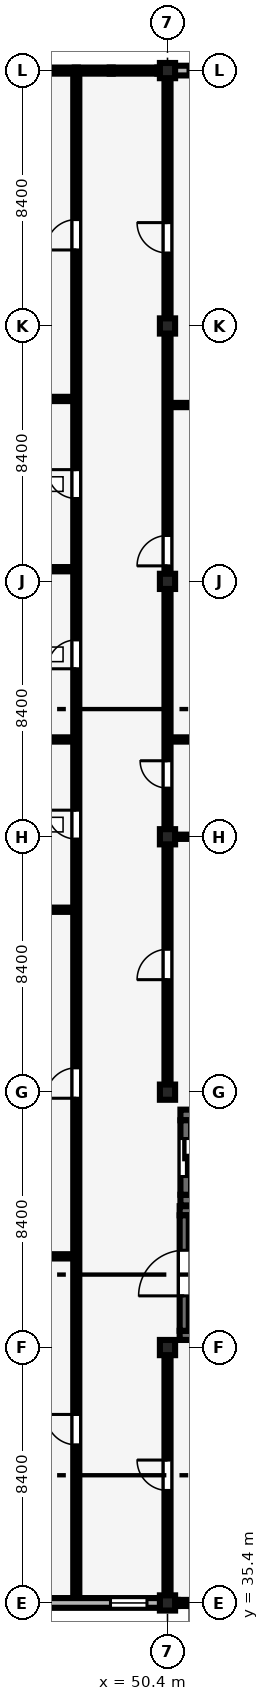
"""IFC4 building model, lengths in metres.
Left out: names, types, materials, properties, quantities, classifications, styles, units other than length and angle.
Written with IfcOpenShell. Run it as: python <this file> out.ifc"""

import sys

from ifc_helpers import new_model, si_unit, direction, frame, frame_2d, origin, origin_2d, place, context, subcontext, project, spatial, rectangle, extrude, element, fill, save


model = new_model("IFC4")
c1 = context("Model", 3, precision=1e-05, world=origin(), true_north=direction((0.0, 1.0)))
c2 = subcontext(c1, "Body", "Model", "MODEL_VIEW")
j1 = project(units=[si_unit("LENGTHUNIT", "METRE"), si_unit("PLANEANGLEUNIT", "RADIAN")], contexts=[c1])
p1 = place(None, origin())
s1 = spatial("IfcSite", under=j1, at=p1, CompositionType="ELEMENT")
p2 = place(p1, origin())
s2 = spatial("IfcBuilding", under=s1, at=p2, CompositionType="ELEMENT")
p3 = place(p2, frame((0.0, 0.0, 13.2)))
s3 = spatial("IfcBuildingStorey", under=s2, at=p3, CompositionType="ELEMENT", Elevation=13.2)
for number, where, z_axis, x_axis in (
    (1, (50.4, 35.4, 0.0), (0.0, 0.0, 1.0), (1.0, 0.0, 0.0)),
    (2, (50.4, 43.8, 0.0), (0.0, 0.0, 1.0), (1.0, 0.0, 0.0)),
    (3, (50.4, 52.2, 0.0), (0.0, 0.0, 1.0), (1.0, 0.0, 0.0)),
    (4, (50.4, 60.6, 0.0), (0.0, 0.0, 1.0), (1.0, 0.0, 0.0)),
    (5, (50.4, 69.0, 0.0), (0.0, 0.0, 1.0), (1.0, 0.0, 0.0)),
    (6, (50.4, 77.4, 0.0), (0.0, 0.0, 1.0), (1.0, 0.0, 0.0)),
    (7, (50.4, 85.8, 0.0), (0.0, 0.0, 1.0), (1.0, 0.0, 0.0)),
):
    element("IfcColumn", number, at=place(p3, frame(where, z_axis=z_axis, x_axis=x_axis)), inside=s3, PredefinedType="COLUMN", context=c2, shape_type="SweptSolid", body=[
        extrude(rectangle(XDim=0.5, YDim=0.5, at=origin_2d()), origin(), (0.0, 0.0, 1.0), 4.2),
    ])
p4 = place(p3, frame((42.225, 35.4, 0.0), z_axis=(0.0, 0.0, 1.0), x_axis=(1.0, 0.0, 0.0)))
e8 = element("IfcWall", 8, at=p4, inside=s3, PredefinedType="SOLIDWALL", context=c2, shape_type="SweptSolid", body=[
    extrude(rectangle(XDim=7.95, YDim=0.32, at=frame_2d((3.975, 0.0))), origin(), (0.0, 0.0, 1.0), 2.98),
])
p5 = place(p4, frame((0.45, 0.0, 0.9)))
e9 = element("IfcOpeningElement", 9, at=p5, cuts=e8, PredefinedType="OPENING", context=c2, shape_type="SweptSolid", body=[
    extrude(rectangle(XDim=1.2, YDim=1.5, at=frame_2d((0.6, 0.75))), frame((0.0, 0.17, 0.0), z_axis=(0.0, -1.0, 0.0), x_axis=(1.0, 0.0, 0.0)), (0.0, 0.0, 1.0), 0.34),
])
p6 = place(p4, frame((6.3, 0.0, 0.9)))
e10 = element("IfcOpeningElement", 10, at=p6, cuts=e8, PredefinedType="OPENING", context=c2, shape_type="SweptSolid", body=[
    extrude(rectangle(XDim=1.2, YDim=1.8, at=frame_2d((0.6, 0.9))), frame((0.0, 0.17, 0.0), z_axis=(0.0, -1.0, 0.0), x_axis=(1.0, 0.0, 0.0)), (0.0, 0.0, 1.0), 0.34),
])
p7 = place(p3, frame((50.625, 85.8, 0.0), z_axis=(0.0, 0.0, 1.0), x_axis=(1.0, 0.0, 0.0)))
e11 = element("IfcWall", 11, at=p7, inside=s3, PredefinedType="SOLIDWALL", context=c2, shape_type="SweptSolid", body=[
    extrude(rectangle(XDim=7.95, YDim=0.32, at=frame_2d((3.975, 0.0))), origin(), (0.0, 0.0, 1.0), 3.16),
])
p8 = place(p7, frame((0.45, 0.0, 0.9)))
e12 = element("IfcOpeningElement", 12, at=p8, cuts=e11, PredefinedType="OPENING", context=c2, shape_type="SweptSolid", body=[
    extrude(rectangle(XDim=1.2, YDim=1.8, at=frame_2d((0.6, 0.9))), frame((0.0, 0.17, 0.0), z_axis=(0.0, -1.0, 0.0), x_axis=(1.0, 0.0, 0.0)), (0.0, 0.0, 1.0), 0.34),
])
p9 = place(p7, frame((6.02, 0.0, 0.9)))
e13 = element("IfcOpeningElement", 13, at=p9, cuts=e11, PredefinedType="OPENING", context=c2, shape_type="SweptSolid", body=[
    extrude(rectangle(XDim=1.68, YDim=2.11, at=frame_2d((0.84, 1.055))), frame((0.0, 0.17, 0.0), z_axis=(0.0, -1.0, 0.0), x_axis=(1.0, 0.0, 0.0)), (0.0, 0.0, 1.0), 0.34),
])
for number, where, z_axis, x_axis in (
    (14, (50.8, 44.2, 0.0), (0.0, 0.0, 1.0), (1.0, 0.0, 0.0)),
    (15, (50.8, 48.3, 0.0), (0.0, 0.0, 1.0), (1.0, 0.0, 0.0)),
):
    element("IfcWall", number, at=place(p3, frame(where, z_axis=z_axis, x_axis=x_axis)), inside=s3, PredefinedType="SHEAR", context=c2, shape_type="SweptSolid", body=[
        extrude(rectangle(XDim=7.6, YDim=0.3, at=frame_2d((3.8, 0.0))), origin(), (0.0, 0.0, 1.0), 4.025),
    ])
p10 = place(p3, frame((50.95, 44.35, 0.0), z_axis=(0.0, 0.0, 1.0), x_axis=(0.0, 1.0, 0.0)))
e16 = element("IfcWall", 16, at=p10, inside=s3, PredefinedType="SHEAR", context=c2, shape_type="SweptSolid", body=[
    extrude(rectangle(XDim=3.8, YDim=0.3, at=frame_2d((1.9, 0.0))), origin(), (0.0, 0.0, 1.0), 4.025),
])
p11 = place(p10, frame((1.15, 0.0, 0.0)))
e17 = element("IfcOpeningElement", 17, at=p11, cuts=e16, PredefinedType="OPENING", context=c2, shape_type="SweptSolid", body=[
    extrude(rectangle(XDim=1.5, YDim=2.2, at=frame_2d((0.75, 1.1))), frame((0.0, 0.16, 0.0), z_axis=(0.0, -1.0, 0.0), x_axis=(1.0, 0.0, 0.0)), (0.0, 0.0, 1.0), 0.32),
])
for number, where, z_axis, x_axis in (
    (18, (50.825, 48.65, 0.0), (0.0, 0.0, 1.0), (1.0, 0.0, 0.0)),
    (19, (50.825, 51.45, 0.0), (0.0, 0.0, 1.0), (1.0, 0.0, 0.0)),
):
    element("IfcWall", number, at=place(p3, frame(where, z_axis=z_axis, x_axis=x_axis)), inside=s3, PredefinedType="SHEAR", context=c2, shape_type="SweptSolid", body=[
        extrude(rectangle(XDim=3.55, YDim=0.35, at=frame_2d((1.775, 0.0))), origin(), (0.0, 0.0, 1.0), 3.92),
    ])
p12 = place(p3, frame((51.0, 48.825, 0.0), z_axis=(0.0, 0.0, 1.0), x_axis=(0.0, 1.0, 0.0)))
e20 = element("IfcWall", 20, at=p12, inside=s3, PredefinedType="SHEAR", context=c2, shape_type="SweptSolid", body=[
    extrude(rectangle(XDim=2.45, YDim=0.35, at=frame_2d((1.225, 0.0))), origin(), (0.0, 0.0, 1.0), 3.92),
])
p13 = place(p12, frame((0.6, 0.0, 0.0)))
e21 = element("IfcOpeningElement", 21, at=p13, cuts=e20, PredefinedType="OPENING", context=c2, shape_type="SweptSolid", body=[
    extrude(rectangle(XDim=1.25, YDim=2.25, at=frame_2d((0.625, 1.125))), frame((0.0, 0.185, 0.0), z_axis=(0.0, -1.0, 0.0), x_axis=(1.0, 0.0, 0.0)), (0.0, 0.0, 1.0), 0.37),
])
p14 = place(p3, frame((42.105, 46.8, 0.0), z_axis=(0.0, 0.0, 1.0), x_axis=(1.0, 0.0, 0.0)))
e22 = element("IfcWall", 22, at=p14, inside=s3, PredefinedType="PARTITIONING", context=c2, shape_type="SweptSolid", body=[
    extrude(rectangle(XDim=5.19, YDim=0.14, at=frame_2d((2.595, 0.0))), origin(), (0.0, 0.0, 1.0), 3.51),
])
p15 = place(p3, frame((42.165, 58.2, 0.0), z_axis=(0.0, 0.0, 1.0), x_axis=(1.0, 0.0, 0.0)))
e23 = element("IfcWall", 23, at=p15, inside=s3, PredefinedType="PARTITIONING", context=c2, shape_type="SweptSolid", body=[
    extrude(rectangle(XDim=5.13, YDim=0.14, at=frame_2d((2.565, 0.0))), origin(), (0.0, 0.0, 1.0), 3.9),
])
p16 = place(p3, frame((42.195, 63.8, 0.0), z_axis=(0.0, 0.0, 1.0), x_axis=(1.0, 0.0, 0.0)))
e24 = element("IfcWall", 24, at=p16, inside=s3, PredefinedType="PARTITIONING", context=c2, shape_type="SweptSolid", body=[
    extrude(rectangle(XDim=5.1, YDim=0.14, at=frame_2d((2.55, 0.0))), origin(), (0.0, 0.0, 1.0), 3.51),
])
for number, where, z_axis, x_axis in (
    (25, (42.195, 69.4, 0.0), (0.0, 0.0, 1.0), (1.0, 0.0, 0.0)),
    (26, (42.195, 75.0, 0.0), (0.0, 0.0, 1.0), (1.0, 0.0, 0.0)),
):
    element("IfcWall", number, at=place(p3, frame(where, z_axis=z_axis, x_axis=x_axis)), inside=s3, PredefinedType="PARTITIONING", context=c2, shape_type="SweptSolid", body=[
        extrude(rectangle(XDim=5.1, YDim=0.14, at=frame_2d((2.55, 0.0))), origin(), (0.0, 0.0, 1.0), 3.9),
    ])
p17 = place(p3, frame((47.4, 35.565, 0.0), z_axis=(0.0, 0.0, 1.0), x_axis=(0.0, 1.0, 0.0)))
e27 = element("IfcWall", 27, at=p17, inside=s3, PredefinedType="PARTITIONING", context=c2, shape_type="SweptSolid", body=[
    extrude(rectangle(XDim=50.13, YDim=0.2, at=frame_2d((25.065, 0.0))), origin(), (0.0, 0.0, 1.0), 3.9),
])
p18 = place(p17, frame((5.035, 0.0, 0.0)))
e28 = element("IfcOpeningElement", 28, at=p18, cuts=e27, PredefinedType="OPENING", context=c2, shape_type="SweptSolid", body=[
    extrude(rectangle(XDim=1.0, YDim=2.15, at=frame_2d((0.5, 1.075))), frame((0.0, 0.11, 0.0), z_axis=(0.0, -1.0, 0.0), x_axis=(1.0, 0.0, 0.0)), (0.0, 0.0, 1.0), 0.22),
])
p19 = place(p17, frame((16.435, 0.0, 0.0)))
e29 = element("IfcOpeningElement", 29, at=p19, cuts=e27, PredefinedType="OPENING", context=c2, shape_type="SweptSolid", body=[
    extrude(rectangle(XDim=1.0, YDim=2.15, at=frame_2d((0.5, 1.075))), frame((0.0, 0.11, 0.0), z_axis=(0.0, -1.0, 0.0), x_axis=(1.0, 0.0, 0.0)), (0.0, 0.0, 1.0), 0.22),
])
p20 = place(p17, frame((24.96, 0.0, 0.0)))
e30 = element("IfcOpeningElement", 30, at=p20, cuts=e27, PredefinedType="OPENING", context=c2, shape_type="SweptSolid", body=[
    extrude(rectangle(XDim=0.95, YDim=2.2, at=frame_2d((0.475, 1.1))), frame((0.0, 0.11, 0.0), z_axis=(0.0, -1.0, 0.0), x_axis=(1.0, 0.0, 0.0)), (0.0, 0.0, 1.0), 0.22),
])
p21 = place(p17, frame((30.56, 0.0, 0.0)))
e31 = element("IfcOpeningElement", 31, at=p21, cuts=e27, PredefinedType="OPENING", context=c2, shape_type="SweptSolid", body=[
    extrude(rectangle(XDim=0.95, YDim=2.2, at=frame_2d((0.475, 1.1))), frame((0.0, 0.11, 0.0), z_axis=(0.0, -1.0, 0.0), x_axis=(1.0, 0.0, 0.0)), (0.0, 0.0, 1.0), 0.22),
])
p22 = place(p17, frame((36.16, 0.0, 0.0)))
e32 = element("IfcOpeningElement", 32, at=p22, cuts=e27, PredefinedType="OPENING", context=c2, shape_type="SweptSolid", body=[
    extrude(rectangle(XDim=0.95, YDim=2.1, at=frame_2d((0.475, 1.05))), frame((0.0, 0.11, 0.0), z_axis=(0.0, -1.0, 0.0), x_axis=(1.0, 0.0, 0.0)), (0.0, 0.0, 1.0), 0.22),
])
p23 = place(p17, frame((44.335, 0.0, 0.0)))
e33 = element("IfcOpeningElement", 33, at=p23, cuts=e27, PredefinedType="OPENING", context=c2, shape_type="SweptSolid", body=[
    extrude(rectangle(XDim=1.0, YDim=2.15, at=frame_2d((0.5, 1.075))), frame((0.0, 0.11, 0.0), z_axis=(0.0, -1.0, 0.0), x_axis=(1.0, 0.0, 0.0)), (0.0, 0.0, 1.0), 0.22),
])
p24 = place(p3, frame((50.4, 35.565, 0.0), z_axis=(0.0, 0.0, 1.0), x_axis=(0.0, 1.0, 0.0)))
e34 = element("IfcWall", 34, at=p24, inside=s3, PredefinedType="PARTITIONING", context=c2, shape_type="SweptSolid", body=[
    extrude(rectangle(XDim=7.975, YDim=0.2, at=frame_2d((3.988, 0.0))), origin(), (0.0, 0.0, 1.0), 2.83),
])
p25 = place(p24, frame((3.535, 0.0, 0.0)))
e35 = element("IfcOpeningElement", 35, at=p25, cuts=e34, PredefinedType="OPENING", context=c2, shape_type="SweptSolid", body=[
    extrude(rectangle(XDim=1.0, YDim=2.15, at=frame_2d((0.5, 1.075))), frame((0.0, 0.11, 0.0), z_axis=(0.0, -1.0, 0.0), x_axis=(1.0, 0.0, 0.0)), (0.0, 0.0, 1.0), 0.22),
])
p26 = place(p3, frame((50.505, 60.6, 0.0), z_axis=(0.0, 0.0, 1.0), x_axis=(1.0, 0.0, 0.0)))
e36 = element("IfcWall", 36, at=p26, inside=s3, PredefinedType="PARTITIONING", context=c2, shape_type="SweptSolid", body=[
    extrude(rectangle(XDim=8.035, YDim=0.14, at=frame_2d((4.018, 0.0))), origin(), (0.0, 0.0, 1.0), 3.11),
])
for number, where, z_axis, x_axis in (
    (37, (50.505, 63.8, 0.0), (0.0, 0.0, 1.0), (1.0, 0.0, 0.0)),
    (38, (50.505, 74.8, 0.0), (0.0, 0.0, 1.0), (1.0, 0.0, 0.0)),
):
    element("IfcWall", number, at=place(p3, frame(where, z_axis=z_axis, x_axis=x_axis)), inside=s3, PredefinedType="PARTITIONING", context=c2, shape_type="SweptSolid", body=[
        extrude(rectangle(XDim=16.57, YDim=0.14, at=frame_2d((8.285, 0.0))), origin(), (0.0, 0.0, 1.0), 3.51),
    ])
p27 = place(p3, frame((50.4, 52.46, 0.0), z_axis=(0.0, 0.0, 1.0), x_axis=(0.0, 1.0, 0.0)))
e39 = element("IfcWall", 39, at=p27, inside=s3, PredefinedType="PARTITIONING", context=c2, shape_type="SweptSolid", body=[
    extrude(rectangle(XDim=7.88, YDim=0.2, at=frame_2d((3.94, 0.0))), origin(), (0.0, 0.0, 1.0), 3.36),
])
p28 = place(p27, frame((3.44, 0.0, 0.0)))
e40 = element("IfcOpeningElement", 40, at=p28, cuts=e39, PredefinedType="OPENING", context=c2, shape_type="SweptSolid", body=[
    extrude(rectangle(XDim=1.0, YDim=2.15, at=frame_2d((0.5, 1.075))), frame((0.0, 0.11, 0.0), z_axis=(0.0, -1.0, 0.0), x_axis=(1.0, 0.0, 0.0)), (0.0, 0.0, 1.0), 0.22),
])
p29 = place(p3, frame((50.4, 60.86, 0.0), z_axis=(0.0, 0.0, 1.0), x_axis=(0.0, 1.0, 0.0)))
e41 = element("IfcWall", 41, at=p29, inside=s3, PredefinedType="PARTITIONING", context=c2, shape_type="SweptSolid", body=[
    extrude(rectangle(XDim=7.88, YDim=0.2, at=frame_2d((3.94, 0.0))), origin(), (0.0, 0.0, 1.0), 3.36),
])
p30 = place(p29, frame((1.34, 0.0, 0.0)))
e42 = element("IfcOpeningElement", 42, at=p30, cuts=e41, PredefinedType="OPENING", context=c2, shape_type="SweptSolid", body=[
    extrude(rectangle(XDim=0.9, YDim=2.1, at=frame_2d((0.45, 1.05))), frame((0.0, 0.11, 0.0), z_axis=(0.0, -1.0, 0.0), x_axis=(1.0, 0.0, 0.0)), (0.0, 0.0, 1.0), 0.22),
])
p31 = place(p3, frame((50.4, 69.26, 0.0), z_axis=(0.0, 0.0, 1.0), x_axis=(0.0, 1.0, 0.0)))
e43 = element("IfcWall", 43, at=p31, inside=s3, PredefinedType="PARTITIONING", context=c2, shape_type="SweptSolid", body=[
    extrude(rectangle(XDim=7.88, YDim=0.2, at=frame_2d((3.94, 0.0))), origin(), (0.0, 0.0, 1.0), 3.31),
])
p32 = place(p31, frame((0.25, 0.0, 0.0)))
e44 = element("IfcOpeningElement", 44, at=p32, cuts=e43, PredefinedType="OPENING", context=c2, shape_type="SweptSolid", body=[
    extrude(rectangle(XDim=1.0, YDim=2.15, at=frame_2d((0.5, 1.075))), frame((0.0, 0.11, 0.0), z_axis=(0.0, -1.0, 0.0), x_axis=(1.0, 0.0, 0.0)), (0.0, 0.0, 1.0), 0.22),
])
p33 = place(p3, frame((50.4, 77.66, 0.0), z_axis=(0.0, 0.0, 1.0), x_axis=(0.0, 1.0, 0.0)))
e45 = element("IfcWall", 45, at=p33, inside=s3, PredefinedType="PARTITIONING", context=c2, shape_type="SweptSolid", body=[
    extrude(rectangle(XDim=8.035, YDim=0.2, at=frame_2d((4.018, 0.0))), origin(), (0.0, 0.0, 1.0), 3.26),
])
p34 = place(p33, frame((2.14, 0.0, 0.0)))
e46 = element("IfcOpeningElement", 46, at=p34, cuts=e45, PredefinedType="OPENING", context=c2, shape_type="SweptSolid", body=[
    extrude(rectangle(XDim=1.0, YDim=2.15, at=frame_2d((0.5, 1.075))), frame((0.0, 0.11, 0.0), z_axis=(0.0, -1.0, 0.0), x_axis=(1.0, 0.0, 0.0)), (0.0, 0.0, 1.0), 0.22),
])
p35 = place(p6, origin())
e47 = element("IfcWindow", 47, at=p35, inside=s3, PartitioningType="SINGLE_PANEL", PredefinedType="WINDOW", context=c2, shape_type="SweptSolid", body=[
    extrude(rectangle(XDim=1.2, YDim=1.8, at=frame_2d((0.6, 0.9))), frame((0.0, 0.03, 0.0), z_axis=(0.0, -1.0, 0.0), x_axis=(1.0, 0.0, 0.0)), (0.0, 0.0, 1.0), 0.06),
])
fill(e10, e47)
p36 = place(p8, origin())
e48 = element("IfcWindow", 48, at=p36, inside=s3, PartitioningType="SINGLE_PANEL", PredefinedType="WINDOW", context=c2, shape_type="SweptSolid", body=[
    extrude(rectangle(XDim=1.2, YDim=1.8, at=frame_2d((0.6, 0.9))), frame((0.0, 0.03, 0.0), z_axis=(0.0, -1.0, 0.0), x_axis=(1.0, 0.0, 0.0)), (0.0, 0.0, 1.0), 0.06),
])
fill(e12, e48)
p37 = place(p11, origin())
e49 = element("IfcDoor", 49, at=p37, inside=s3, OperationType="DOUBLE_DOOR_SINGLE_SWING", PredefinedType="DOOR", context=c2, shape_type="SweptSolid", body=[
    extrude(rectangle(XDim=1.5, YDim=2.2, at=frame_2d((0.75, 1.1))), frame((0.0, 0.025, 0.0), z_axis=(0.0, -1.0, 0.0), x_axis=(1.0, 0.0, 0.0)), (0.0, 0.0, 1.0), 0.05),
])
fill(e17, e49)
p38 = place(p13, origin())
e50 = element("IfcDoor", 50, at=p38, inside=s3, OperationType="DOUBLE_DOOR_SLIDING", PredefinedType="DOOR", context=c2, shape_type="SweptSolid", body=[
    extrude(rectangle(XDim=1.25, YDim=2.25, at=frame_2d((0.625, 1.125))), frame((0.0, 0.025, 0.0), z_axis=(0.0, -1.0, 0.0), x_axis=(1.0, 0.0, 0.0)), (0.0, 0.0, 1.0), 0.05),
])
fill(e21, e50)
p39 = place(p18, origin())
e51 = element("IfcDoor", 51, at=p39, inside=s3, OperationType="SINGLE_SWING_RIGHT", PredefinedType="DOOR", context=c2, shape_type="SweptSolid", body=[
    extrude(rectangle(XDim=1.0, YDim=2.15, at=frame_2d((0.5, 1.075))), frame((0.0, 0.025, 0.0), z_axis=(0.0, -1.0, 0.0), x_axis=(1.0, 0.0, 0.0)), (0.0, 0.0, 1.0), 0.05),
])
fill(e28, e51)
p40 = place(p19, origin())
e52 = element("IfcDoor", 52, at=p40, inside=s3, OperationType="SINGLE_SWING_LEFT", PredefinedType="DOOR", context=c2, shape_type="SweptSolid", body=[
    extrude(rectangle(XDim=1.0, YDim=2.15, at=frame_2d((0.5, 1.075))), frame((0.0, 0.025, 0.0), z_axis=(0.0, -1.0, 0.0), x_axis=(1.0, 0.0, 0.0)), (0.0, 0.0, 1.0), 0.05),
])
fill(e29, e52)
p41 = place(p20, origin())
e53 = element("IfcDoor", 53, at=p41, inside=s3, OperationType="SINGLE_SWING_RIGHT", PredefinedType="DOOR", context=c2, shape_type="SweptSolid", body=[
    extrude(rectangle(XDim=0.95, YDim=2.2, at=frame_2d((0.475, 1.1))), frame((0.0, 0.025, 0.0), z_axis=(0.0, -1.0, 0.0), x_axis=(1.0, 0.0, 0.0)), (0.0, 0.0, 1.0), 0.05),
])
fill(e30, e53)
p42 = place(p21, origin())
e54 = element("IfcDoor", 54, at=p42, inside=s3, OperationType="SINGLE_SWING_LEFT", PredefinedType="DOOR", context=c2, shape_type="SweptSolid", body=[
    extrude(rectangle(XDim=0.95, YDim=2.2, at=frame_2d((0.475, 1.1))), frame((0.0, 0.025, 0.0), z_axis=(0.0, -1.0, 0.0), x_axis=(1.0, 0.0, 0.0)), (0.0, 0.0, 1.0), 0.05),
])
fill(e31, e54)
p43 = place(p22, origin())
e55 = element("IfcDoor", 55, at=p43, inside=s3, OperationType="SINGLE_SWING_RIGHT", PredefinedType="DOOR", context=c2, shape_type="SweptSolid", body=[
    extrude(rectangle(XDim=0.95, YDim=2.1, at=frame_2d((0.475, 1.05))), frame((0.0, 0.025, 0.0), z_axis=(0.0, -1.0, 0.0), x_axis=(1.0, 0.0, 0.0)), (0.0, 0.0, 1.0), 0.05),
])
fill(e32, e55)
p44 = place(p23, origin())
e56 = element("IfcDoor", 56, at=p44, inside=s3, OperationType="SINGLE_SWING_LEFT", PredefinedType="DOOR", context=c2, shape_type="SweptSolid", body=[
    extrude(rectangle(XDim=1.0, YDim=2.15, at=frame_2d((0.5, 1.075))), frame((0.0, 0.025, 0.0), z_axis=(0.0, -1.0, 0.0), x_axis=(1.0, 0.0, 0.0)), (0.0, 0.0, 1.0), 0.05),
])
fill(e33, e56)
p45 = place(p25, origin())
e57 = element("IfcDoor", 57, at=p45, inside=s3, OperationType="SINGLE_SWING_RIGHT", PredefinedType="DOOR", context=c2, shape_type="SweptSolid", body=[
    extrude(rectangle(XDim=1.0, YDim=2.15, at=frame_2d((0.5, 1.075))), frame((0.0, 0.025, 0.0), z_axis=(0.0, -1.0, 0.0), x_axis=(1.0, 0.0, 0.0)), (0.0, 0.0, 1.0), 0.05),
])
fill(e35, e57)
p46 = place(p28, origin())
e58 = element("IfcDoor", 58, at=p46, inside=s3, OperationType="SINGLE_SWING_LEFT", PredefinedType="DOOR", context=c2, shape_type="SweptSolid", body=[
    extrude(rectangle(XDim=1.0, YDim=2.15, at=frame_2d((0.5, 1.075))), frame((0.0, 0.025, 0.0), z_axis=(0.0, -1.0, 0.0), x_axis=(1.0, 0.0, 0.0)), (0.0, 0.0, 1.0), 0.05),
])
fill(e40, e58)
p47 = place(p30, origin())
e59 = element("IfcDoor", 59, at=p47, inside=s3, OperationType="SINGLE_SWING_RIGHT", PredefinedType="DOOR", context=c2, shape_type="SweptSolid", body=[
    extrude(rectangle(XDim=0.9, YDim=2.1, at=frame_2d((0.45, 1.05))), frame((0.0, 0.025, 0.0), z_axis=(0.0, -1.0, 0.0), x_axis=(1.0, 0.0, 0.0)), (0.0, 0.0, 1.0), 0.05),
])
fill(e42, e59)
p48 = place(p32, origin())
e60 = element("IfcDoor", 60, at=p48, inside=s3, OperationType="SINGLE_SWING_LEFT", PredefinedType="DOOR", context=c2, shape_type="SweptSolid", body=[
    extrude(rectangle(XDim=1.0, YDim=2.15, at=frame_2d((0.5, 1.075))), frame((0.0, 0.025, 0.0), z_axis=(0.0, -1.0, 0.0), x_axis=(1.0, 0.0, 0.0)), (0.0, 0.0, 1.0), 0.05),
])
fill(e44, e60)
p49 = place(p34, origin())
e61 = element("IfcDoor", 61, at=p49, inside=s3, OperationType="SINGLE_SWING_RIGHT", PredefinedType="DOOR", context=c2, shape_type="SweptSolid", body=[
    extrude(rectangle(XDim=1.0, YDim=2.15, at=frame_2d((0.5, 1.075))), frame((0.0, 0.025, 0.0), z_axis=(0.0, -1.0, 0.0), x_axis=(1.0, 0.0, 0.0)), (0.0, 0.0, 1.0), 0.05),
])
fill(e46, e61)
save(model, sys.argv[1])
